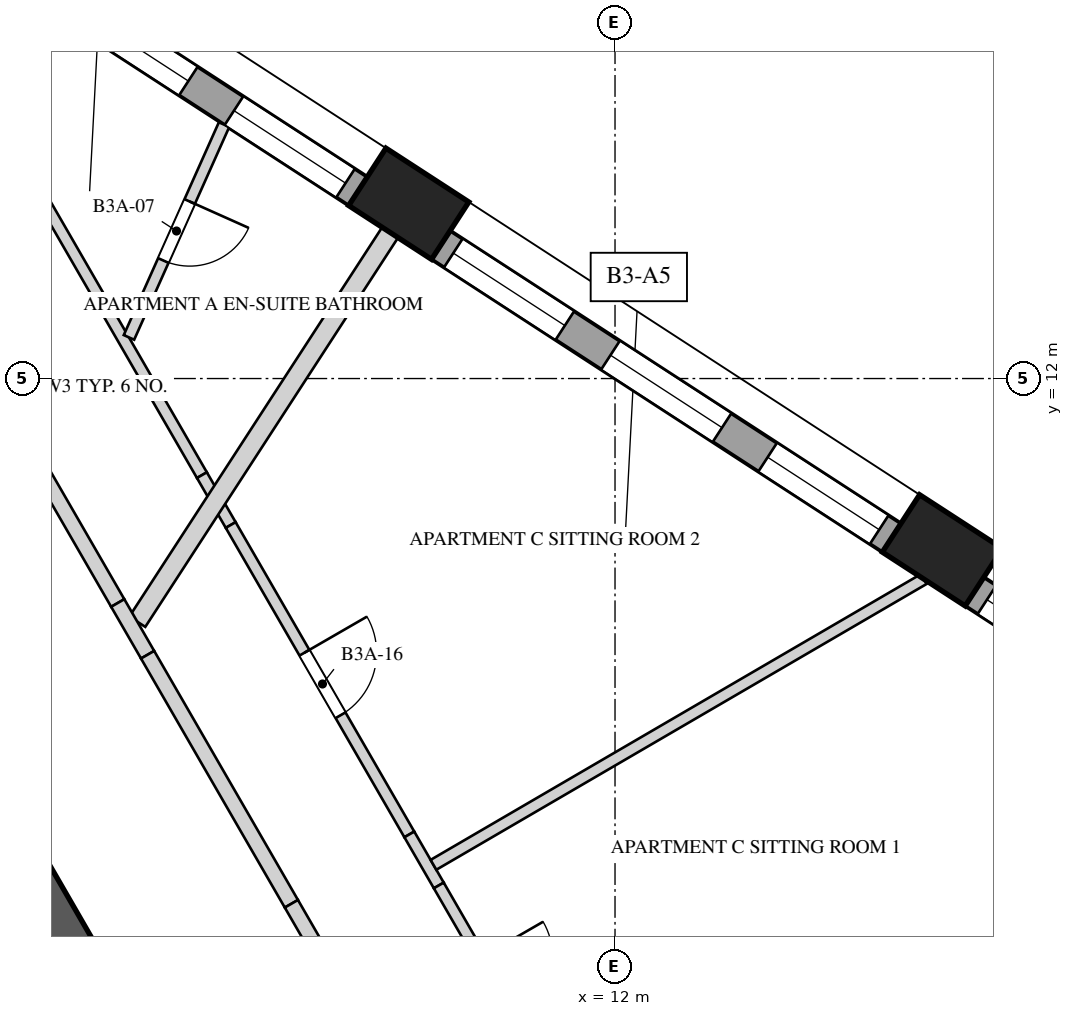
"""IFC4 building model, lengths in metres.
Left out: names, types, materials, properties, quantities, classifications, styles, units other than length and angle.
Written with IfcOpenShell. Run it as: python <this file> out.ifc"""

import sys

from ifc_helpers import new_model, si_unit, direction, frame, frame_2d, origin, origin_2d, place, context, subcontext, project, spatial, rectangle, extrude, element, fill, save


model = new_model("IFC4")
c1 = context("Model", 3, precision=1e-05, world=origin(), true_north=direction((0.0, 1.0)))
c2 = subcontext(c1, "Body", "Model", "MODEL_VIEW")
j1 = project(units=[si_unit("LENGTHUNIT", "METRE"), si_unit("PLANEANGLEUNIT", "RADIAN")], contexts=[c1])
p1 = place(None, origin())
s1 = spatial("IfcSite", under=j1, at=p1, CompositionType="ELEMENT")
p2 = place(p1, origin())
s2 = spatial("IfcBuilding", under=s1, at=p2, CompositionType="ELEMENT")
p3 = place(p2, frame((0.0, 0.0, 133.6)))
s3 = spatial("IfcBuildingStorey", under=s2, at=p3, CompositionType="ELEMENT", Elevation=133.6)
p4 = place(p3, frame((9.729, -4.25, 0.0), z_axis=(0.0, 0.0, 1.0), x_axis=(-0.500004814304, 0.866022624227, 0.0)))
e1 = element("IfcWall", 1, at=p4, inside=s3, PredefinedType="SHEAR", context=c2, shape_type="SweptSolid", body=[
    extrude(rectangle(XDim=17.09, YDim=0.9, at=frame_2d((8.545, 0.0))), origin(), (0.0, 0.0, 1.0), 4.0),
])
p5 = place(p4, frame((6.82, 0.0, 0.0)))
e2 = element("IfcOpeningElement", 2, at=p5, cuts=e1, PredefinedType="OPENING", context=c2, shape_type="SweptSolid", body=[
    extrude(rectangle(XDim=1.0, YDim=2.4, at=frame_2d((0.5, 1.2))), frame((0.0, 0.46, 0.0), z_axis=(0.0, -1.0, 0.0), x_axis=(1.0, 0.0, 0.0)), (0.0, 0.0, 1.0), 0.92),
])
for number, where, z_axis, x_axis in (
    (3, (16.307, 9.74, 0.0), (0.0, 0.0, 1.0), (-0.839, 0.545, 0.0)),
    (4, (9.286, 14.299, 0.0), (0.0, 0.0, 1.0), (-0.839, 0.545, 0.0)),
):
    element("IfcColumn", number, at=place(p3, frame(where, z_axis=z_axis, x_axis=x_axis)), inside=s3, PredefinedType="COLUMN", context=c2, shape_type="SweptSolid", body=[
        extrude(rectangle(XDim=1.3, YDim=0.9, at=origin_2d()), origin(), (0.0, 0.0, 1.0), 4.0),
    ])
p6 = place(p3, frame((18.525, 8.031, 0.0), z_axis=(0.0, 0.0, 1.0), x_axis=(-0.838675466927, 0.544631491171, 0.0)))
e5 = element("IfcWall", 5, at=p6, inside=s3, PredefinedType="SOLIDWALL", context=c2, shape_type="SweptSolid", body=[
    extrude(rectangle(XDim=2.14, YDim=0.45, at=frame_2d((1.07, 0.0))), origin(), (0.0, 0.0, 1.0), 3.3),
])
p7 = place(p6, frame((0.195, 0.0, 0.5)))
e6 = element("IfcOpeningElement", 6, at=p7, cuts=e5, PredefinedType="OPENING", context=c2, shape_type="SweptSolid", body=[
    extrude(rectangle(XDim=1.75, YDim=2.65, at=frame_2d((0.875, 1.325))), frame((0.0, 0.235, 0.0), z_axis=(0.0, -1.0, 0.0), x_axis=(1.0, 0.0, 0.0)), (0.0, 0.0, 1.0), 0.47),
])
p8 = place(p3, frame((15.639, 9.905, 0.0), z_axis=(0.0, 0.0, 1.0), x_axis=(-0.838677021821, 0.54462909679, 0.0)))
e7 = element("IfcWall", 7, at=p8, inside=s3, PredefinedType="SOLIDWALL", context=c2, shape_type="SweptSolid", body=[
    extrude(rectangle(XDim=7.072, YDim=0.45, at=frame_2d((3.536, 0.0))), origin(), (0.0, 0.0, 1.0), 3.3),
])
p9 = place(p8, frame((0.195, 0.0, 0.5)))
e8 = element("IfcOpeningElement", 8, at=p9, cuts=e7, PredefinedType="OPENING", context=c2, shape_type="SweptSolid", body=[
    extrude(rectangle(XDim=1.75, YDim=2.65, at=frame_2d((0.875, 1.325))), frame((0.0, 0.235, 0.0), z_axis=(0.0, -1.0, 0.0), x_axis=(1.0, 0.0, 0.0)), (0.0, 0.0, 1.0), 0.47),
])
p10 = place(p8, frame((2.661, 0.0, 0.5)))
e9 = element("IfcOpeningElement", 9, at=p10, cuts=e7, PredefinedType="OPENING", context=c2, shape_type="SweptSolid", body=[
    extrude(rectangle(XDim=1.75, YDim=2.65, at=frame_2d((0.875, 1.325))), frame((0.0, 0.235, 0.0), z_axis=(0.0, -1.0, 0.0), x_axis=(1.0, 0.0, 0.0)), (0.0, 0.0, 1.0), 0.47),
])
p11 = place(p8, frame((5.126, 0.0, 0.5)))
e10 = element("IfcOpeningElement", 10, at=p11, cuts=e7, PredefinedType="OPENING", context=c2, shape_type="SweptSolid", body=[
    extrude(rectangle(XDim=1.75, YDim=2.65, at=frame_2d((0.875, 1.325))), frame((0.0, 0.235, 0.0), z_axis=(0.0, -1.0, 0.0), x_axis=(1.0, 0.0, 0.0)), (0.0, 0.0, 1.0), 0.47),
])
p12 = place(p3, frame((8.618, 14.465, 0.0), z_axis=(0.0, 0.0, 1.0), x_axis=(-0.838661251934, 0.544653380146, 0.0)))
e11 = element("IfcWall", 11, at=p12, inside=s3, PredefinedType="SOLIDWALL", context=c2, shape_type="SweptSolid", body=[
    extrude(rectangle(XDim=7.072, YDim=0.45, at=frame_2d((3.536, 0.0))), origin(), (0.0, 0.0, 1.0), 3.3),
])
p13 = place(p12, frame((0.195, 0.0, 0.5)))
e12 = element("IfcOpeningElement", 12, at=p13, cuts=e11, PredefinedType="OPENING", context=c2, shape_type="SweptSolid", body=[
    extrude(rectangle(XDim=1.75, YDim=2.65, at=frame_2d((0.875, 1.325))), frame((0.0, 0.235, 0.0), z_axis=(0.0, -1.0, 0.0), x_axis=(1.0, 0.0, 0.0)), (0.0, 0.0, 1.0), 0.47),
])
p14 = place(p12, frame((2.661, 0.0, 0.5)))
e13 = element("IfcOpeningElement", 13, at=p14, cuts=e11, PredefinedType="OPENING", context=c2, shape_type="SweptSolid", body=[
    extrude(rectangle(XDim=1.75, YDim=2.65, at=frame_2d((0.875, 1.325))), frame((0.0, 0.235, 0.0), z_axis=(0.0, -1.0, 0.0), x_axis=(1.0, 0.0, 0.0)), (0.0, 0.0, 1.0), 0.47),
])
p15 = place(p12, frame((5.126, 0.0, 0.5)))
e14 = element("IfcOpeningElement", 14, at=p15, cuts=e11, PredefinedType="OPENING", context=c2, shape_type="SweptSolid", body=[
    extrude(rectangle(XDim=1.75, YDim=2.65, at=frame_2d((0.875, 1.325))), frame((0.0, 0.235, 0.0), z_axis=(0.0, -1.0, 0.0), x_axis=(1.0, 0.0, 0.0)), (0.0, 0.0, 1.0), 0.47),
])
p16 = place(p3, frame((5.092, 2.281, 0.0), z_axis=(0.0, 0.0, 1.0), x_axis=(-0.500018594424, 0.866014668023, 0.0)))
e15 = element("IfcWall", 15, at=p16, inside=s3, PredefinedType="SOLIDWALL", context=c2, shape_type="SweptSolid", body=[
    extrude(rectangle(XDim=4.9, YDim=0.4, at=frame_2d((2.45, 0.0))), origin(), (0.0, 0.0, 1.0), 3.65),
])
p17 = place(p3, frame((3.926, 15.3, 0.0), z_axis=(0.0, 0.0, 1.0), x_axis=(0.499974706519, -0.86604000649, 0.0)))
e16 = element("IfcWall", 16, at=p17, inside=s3, PredefinedType="PARTITIONING", context=c2, shape_type="SweptSolid", body=[
    extrude(rectangle(XDim=5.278, YDim=0.15, at=frame_2d((2.639, 0.0))), origin(), (0.0, 0.0, 1.0), 3.65),
])
p18 = place(p3, frame((6.565, 10.729, 0.0), z_axis=(0.0, 0.0, 1.0), x_axis=(0.500159472144, -0.86593331292, 0.0)))
e17 = element("IfcWall", 17, at=p18, inside=s3, PredefinedType="PARTITIONING", context=c2, shape_type="SweptSolid", body=[
    extrude(rectangle(XDim=0.758, YDim=0.15, at=frame_2d((0.379, 0.0))), origin(), (0.0, 0.0, 1.0), 2.95),
])
p19 = place(p3, frame((6.944, 10.073, 0.0), z_axis=(0.0, 0.0, 1.0), x_axis=(0.499993726502, -0.86602902576, 0.0)))
e18 = element("IfcWall", 18, at=p19, inside=s3, PredefinedType="PARTITIONING", context=c2, shape_type="SweptSolid", body=[
    extrude(rectangle(XDim=4.7, YDim=0.15, at=frame_2d((2.35, 0.0))), origin(), (0.0, 0.0, 1.0), 3.65),
])
p20 = place(p19, frame((1.94, 0.0, 0.0)))
e19 = element("IfcOpeningElement", 19, at=p20, cuts=e18, PredefinedType="OPENING", context=c2, shape_type="SweptSolid", body=[
    extrude(rectangle(XDim=0.95, YDim=2.4, at=frame_2d((0.475, 1.2))), frame((0.0, 0.085, 0.0), z_axis=(0.0, -1.0, 0.0), x_axis=(1.0, 0.0, 0.0)), (0.0, 0.0, 1.0), 0.17),
])
p21 = place(p3, frame((9.294, 6.002, 0.0), z_axis=(0.0, 0.0, 1.0), x_axis=(0.499831512295, -0.866122658356, 0.0)))
e20 = element("IfcWall", 20, at=p21, inside=s3, PredefinedType="PARTITIONING", context=c2, shape_type="SweptSolid", body=[
    extrude(rectangle(XDim=0.775, YDim=0.15, at=frame_2d((0.388, 0.0))), origin(), (0.0, 0.0, 1.0), 2.75),
])
p22 = place(p3, frame((9.681, 5.331, 0.0), z_axis=(0.0, 0.0, 1.0), x_axis=(0.500034735108, -0.866005348532, 0.0)))
e21 = element("IfcWall", 21, at=p22, inside=s3, PredefinedType="PARTITIONING", context=c2, shape_type="SweptSolid", body=[
    extrude(rectangle(XDim=2.797, YDim=0.15, at=frame_2d((1.398, 0.0))), origin(), (0.0, 0.0, 1.0), 3.65),
])
p23 = place(p22, frame((1.1, 0.0, 0.0)))
e22 = element("IfcOpeningElement", 22, at=p23, cuts=e21, PredefinedType="OPENING", context=c2, shape_type="SweptSolid", body=[
    extrude(rectangle(XDim=0.95, YDim=2.4, at=frame_2d((0.475, 1.2))), frame((0.0, 0.085, 0.0), z_axis=(0.0, -1.0, 0.0), x_axis=(1.0, 0.0, 0.0)), (0.0, 0.0, 1.0), 0.17),
])
p24 = place(p3, frame((6.856, 15.341, 0.0), z_axis=(0.0, 0.0, 1.0), x_axis=(-0.408065741822, -0.912952545509, 0.0)))
e23 = element("IfcWall", 23, at=p24, inside=s3, PredefinedType="PARTITIONING", context=c2, shape_type="SweptSolid", body=[
    extrude(rectangle(XDim=3.066, YDim=0.15, at=frame_2d((1.533, 0.0))), origin(), (0.0, 0.0, 1.0), 3.65),
])
p25 = place(p24, frame((1.108, 0.0, 0.0)))
e24 = element("IfcOpeningElement", 24, at=p25, cuts=e23, PredefinedType="OPENING", context=c2, shape_type="SweptSolid", body=[
    extrude(rectangle(XDim=0.85, YDim=2.4, at=frame_2d((0.425, 1.2))), frame((0.0, 0.085, 0.0), z_axis=(0.0, -1.0, 0.0), x_axis=(1.0, 0.0, 0.0)), (0.0, 0.0, 1.0), 0.17),
])
p26 = place(p3, frame((9.041, 13.922, 0.0), z_axis=(0.0, 0.0, 1.0), x_axis=(-0.544639775338, -0.838670087174, 0.0)))
e25 = element("IfcWall", 25, at=p26, inside=s3, PredefinedType="SOLIDWALL", context=c2, shape_type="SweptSolid", body=[
    extrude(rectangle(XDim=6.106, YDim=0.25, at=frame_2d((3.053, 0.0))), origin(), (0.0, 0.0, 1.0), 2.95),
])
p27 = place(p3, frame((9.612, 5.603, 0.0), z_axis=(0.0, 0.0, 1.0), x_axis=(0.863953189991, 0.503572125425, 0.0)))
e26 = element("IfcWall", 26, at=p27, inside=s3, PredefinedType="PARTITIONING", context=c2, shape_type="SweptSolid", body=[
    extrude(rectangle(XDim=7.466, YDim=0.15, at=frame_2d((3.733, 0.0))), origin(), (0.0, 0.0, 1.0), 2.75),
])
p28 = place(p3, frame((11.468, 2.386, 0.0), z_axis=(0.0, 0.0, 1.0), x_axis=(0.979030724859, 0.203712640211, 0.0)))
e27 = element("IfcWall", 27, at=p28, inside=s3, PredefinedType="PARTITIONING", context=c2, shape_type="SweptSolid", body=[
    extrude(rectangle(XDim=11.864, YDim=0.15, at=frame_2d((5.932, 0.0))), origin(), (0.0, 0.0, 1.0), 2.55),
])
p29 = place(p3, frame((2.887, 13.5, 0.0), z_axis=(0.0, 0.0, 1.0), x_axis=(0.50000466804, -0.866022708674, 0.0)))
e28 = element("IfcWall", 28, at=p29, inside=s3, PredefinedType="SOLIDWALL", context=c2, shape_type="SweptSolid", body=[
    extrude(rectangle(XDim=5.142, YDim=0.2, at=frame_2d((2.571, 0.0))), origin(), (0.0, 0.0, 1.0), 3.65),
])
p30 = place(p3, frame((5.458, 9.047, 0.0), z_axis=(0.0, 0.0, 1.0), x_axis=(0.499982474044, -0.866035522163, 0.0)))
e29 = element("IfcWall", 29, at=p30, inside=s3, PredefinedType="SOLIDWALL", context=c2, shape_type="SweptSolid", body=[
    extrude(rectangle(XDim=0.786, YDim=0.2, at=frame_2d((0.393, 0.0))), origin(), (0.0, 0.0, 1.0), 2.95),
])
p31 = place(p3, frame((5.851, 8.366, 0.0), z_axis=(0.0, 0.0, 1.0), x_axis=(0.499998034377, -0.866026538634, 0.0)))
e30 = element("IfcWall", 30, at=p31, inside=s3, PredefinedType="SOLIDWALL", context=c2, shape_type="SweptSolid", body=[
    extrude(rectangle(XDim=3.783, YDim=0.2, at=frame_2d((1.892, 0.0))), origin(), (0.0, 0.0, 1.0), 3.65),
])
p32 = place(p3, frame((7.742, 5.09, 0.0), z_axis=(0.0, 0.0, 1.0), x_axis=(0.500109828528, -0.865961984968, 0.0)))
e31 = element("IfcWall", 31, at=p32, inside=s3, PredefinedType="SOLIDWALL", context=c2, shape_type="SweptSolid", body=[
    extrude(rectangle(XDim=0.8, YDim=0.2, at=frame_2d((0.4, 0.0))), origin(), (0.0, 0.0, 1.0), 2.75),
])
p33 = place(p7, origin())
e32 = element("IfcWindow", 32, at=p33, inside=s3, PartitioningType="SINGLE_PANEL", PredefinedType="WINDOW", context=c2, shape_type="SweptSolid", body=[
    extrude(rectangle(XDim=1.75, YDim=2.65, at=frame_2d((0.875, 1.325))), frame((0.0, 0.03, 0.0), z_axis=(0.0, -1.0, 0.0), x_axis=(1.0, 0.0, 0.0)), (0.0, 0.0, 1.0), 0.06),
])
fill(e6, e32)
p34 = place(p9, origin())
e33 = element("IfcWindow", 33, at=p34, inside=s3, PartitioningType="SINGLE_PANEL", PredefinedType="WINDOW", context=c2, shape_type="SweptSolid", body=[
    extrude(rectangle(XDim=1.75, YDim=2.65, at=frame_2d((0.875, 1.325))), frame((0.0, 0.03, 0.0), z_axis=(0.0, -1.0, 0.0), x_axis=(1.0, 0.0, 0.0)), (0.0, 0.0, 1.0), 0.06),
])
fill(e8, e33)
p35 = place(p10, origin())
e34 = element("IfcWindow", 34, at=p35, inside=s3, PartitioningType="SINGLE_PANEL", PredefinedType="WINDOW", context=c2, shape_type="SweptSolid", body=[
    extrude(rectangle(XDim=1.75, YDim=2.65, at=frame_2d((0.875, 1.325))), frame((0.0, 0.03, 0.0), z_axis=(0.0, -1.0, 0.0), x_axis=(1.0, 0.0, 0.0)), (0.0, 0.0, 1.0), 0.06),
])
fill(e9, e34)
p36 = place(p11, origin())
e35 = element("IfcWindow", 35, at=p36, inside=s3, PartitioningType="SINGLE_PANEL", PredefinedType="WINDOW", context=c2, shape_type="SweptSolid", body=[
    extrude(rectangle(XDim=1.75, YDim=2.65, at=frame_2d((0.875, 1.325))), frame((0.0, 0.03, 0.0), z_axis=(0.0, -1.0, 0.0), x_axis=(1.0, 0.0, 0.0)), (0.0, 0.0, 1.0), 0.06),
])
fill(e10, e35)
p37 = place(p13, origin())
e36 = element("IfcWindow", 36, at=p37, inside=s3, PartitioningType="SINGLE_PANEL", PredefinedType="WINDOW", context=c2, shape_type="SweptSolid", body=[
    extrude(rectangle(XDim=1.75, YDim=2.65, at=frame_2d((0.875, 1.325))), frame((0.0, 0.03, 0.0), z_axis=(0.0, -1.0, 0.0), x_axis=(1.0, 0.0, 0.0)), (0.0, 0.0, 1.0), 0.06),
])
fill(e12, e36)
p38 = place(p14, origin())
e37 = element("IfcWindow", 37, at=p38, inside=s3, PartitioningType="SINGLE_PANEL", PredefinedType="WINDOW", context=c2, shape_type="SweptSolid", body=[
    extrude(rectangle(XDim=1.75, YDim=2.65, at=frame_2d((0.875, 1.325))), frame((0.0, 0.03, 0.0), z_axis=(0.0, -1.0, 0.0), x_axis=(1.0, 0.0, 0.0)), (0.0, 0.0, 1.0), 0.06),
])
fill(e13, e37)
p39 = place(p25, origin())
e38 = element("IfcDoor", 38, at=p39, inside=s3, OperationType="SINGLE_SWING_LEFT", PredefinedType="DOOR", context=c2, shape_type="SweptSolid", body=[
    extrude(rectangle(XDim=0.85, YDim=2.4, at=frame_2d((0.425, 1.2))), frame((0.0, 0.025, 0.0), z_axis=(0.0, -1.0, 0.0), x_axis=(1.0, 0.0, 0.0)), (0.0, 0.0, 1.0), 0.05),
])
fill(e24, e38)
p40 = place(p20, origin())
e39 = element("IfcDoor", 39, at=p40, inside=s3, OperationType="SINGLE_SWING_RIGHT", PredefinedType="DOOR", context=c2, shape_type="SweptSolid", body=[
    extrude(rectangle(XDim=0.95, YDim=2.4, at=frame_2d((0.475, 1.2))), frame((0.0, 0.025, 0.0), z_axis=(0.0, -1.0, 0.0), x_axis=(1.0, 0.0, 0.0)), (0.0, 0.0, 1.0), 0.05),
])
fill(e19, e39)
save(model, sys.argv[1])
